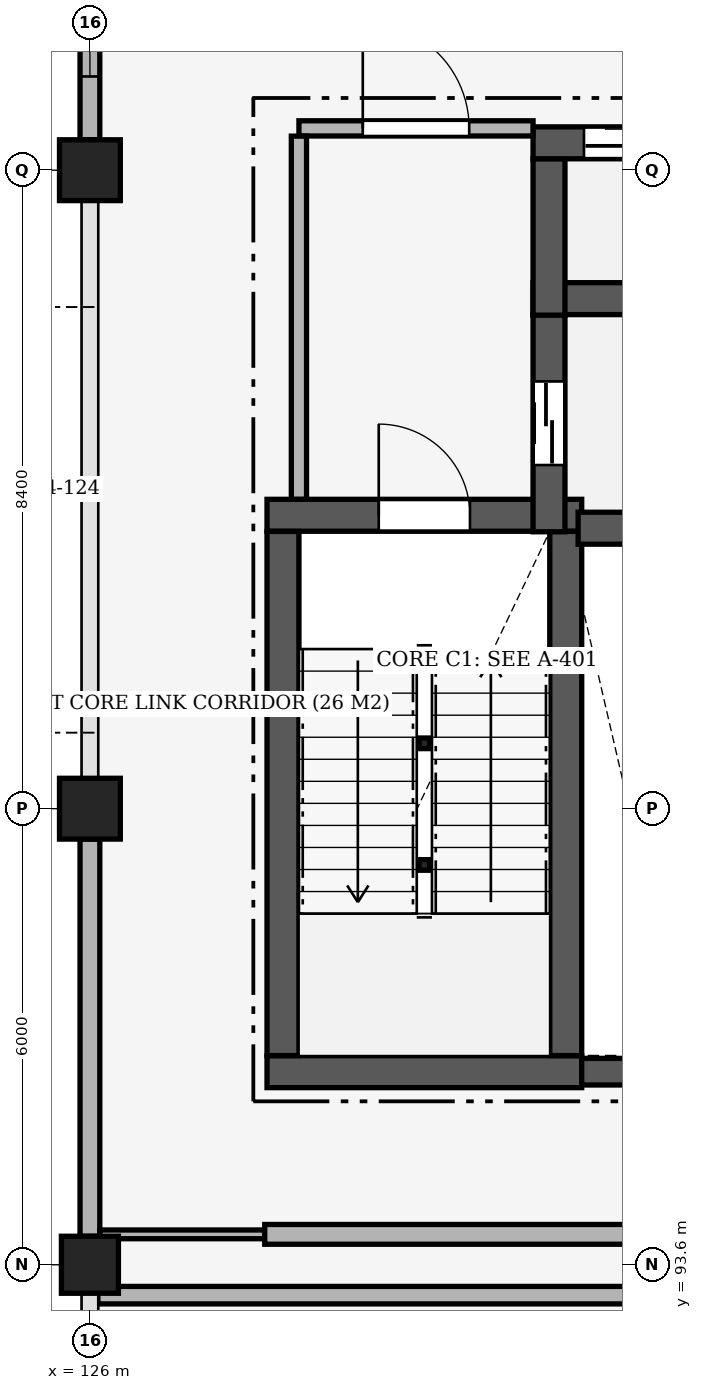
"""IFC4 building model, lengths in metres.
Left out: names, types, materials, properties, quantities, classifications, styles, units other than length and angle.
Written with IfcOpenShell. Run it as: python <this file> out.ifc"""

import sys

from ifc_helpers import new_model, si_unit, direction, frame, frame_2d, origin, origin_2d, place, context, subcontext, project, spatial, rectangle, hollow_circle, extrude, element, fill, save


model = new_model("IFC4")
c1 = context("Model", 3, precision=1e-05, world=origin(), true_north=direction((0.0, 1.0)))
c2 = subcontext(c1, "Body", "Model", "MODEL_VIEW")
j1 = project(units=[si_unit("LENGTHUNIT", "METRE"), si_unit("PLANEANGLEUNIT", "RADIAN")], contexts=[c1])
p1 = place(None, origin())
s1 = spatial("IfcSite", under=j1, at=p1, CompositionType="ELEMENT")
p2 = place(p1, origin())
s2 = spatial("IfcBuilding", under=s1, at=p2, CompositionType="ELEMENT")
p3 = place(p2, frame((0.0, 0.0, 20.4)))
s3 = spatial("IfcBuildingStorey", under=s2, at=p3, CompositionType="ELEMENT", Elevation=20.4)
p4 = place(p3, frame((126.0, 93.6, 0.0), z_axis=(0.0, 0.0, 1.0), x_axis=(1.0, 0.0, 0.0)))
e1 = element("IfcColumn", 1, at=p4, inside=s3, PredefinedType="COLUMN", context=c2, shape_type="SweptSolid", body=[
    extrude(rectangle(XDim=0.75, YDim=0.75, at=origin_2d()), origin(), (0.0, 0.0, 1.0), 4.8),
])
for number, where, z_axis, x_axis in (
    (2, (126.0, 99.6, 0.0), (0.0, 0.0, 1.0), (1.0, 0.0, 0.0)),
    (3, (126.0, 108.0, 0.0), (0.0, 0.0, 1.0), (1.0, 0.0, 0.0)),
):
    element("IfcColumn", number, at=place(p3, frame(where, z_axis=z_axis, x_axis=x_axis)), inside=s3, PredefinedType="COLUMN", context=c2, shape_type="SweptSolid", body=[
        extrude(rectangle(XDim=0.8, YDim=0.8, at=origin_2d()), origin(), (0.0, 0.0, 1.0), 4.8),
    ])
for number, where, z_axis, x_axis in (
    (4, (130.4, 98.86, -2.98), (0.0, 0.0, 1.0), (1.0, 0.0, 0.0)),
    (5, (130.4, 100.46, -2.98), (0.0, 0.0, 1.0), (1.0, 0.0, 0.0)),
):
    element("IfcColumn", number, at=place(p3, frame(where, z_axis=z_axis, x_axis=x_axis)), inside=s3, PredefinedType="COLUMN", context=c2, shape_type="SweptSolid", body=[
        extrude(hollow_circle(Radius=0.07, WallThickness=0.008, at=origin_2d()), origin(), (0.0, 0.0, 1.0), 4.95),
    ])
p5 = place(p3, frame((126.0, 93.975, 0.0), z_axis=(0.0, 0.0, 1.0), x_axis=(0.0, 1.0, 0.0)))
e6 = element("IfcWall", 6, at=p5, inside=s3, PredefinedType="SOLIDWALL", context=c2, shape_type="SweptSolid", body=[
    extrude(rectangle(XDim=5.225, YDim=0.26, at=frame_2d((2.612, 0.0))), origin(), (0.0, 0.0, 1.0), 4.0),
])
p6 = place(p3, frame((126.0, 108.4, 0.0), z_axis=(0.0, 0.0, 1.0), x_axis=(0.0, 1.0, 0.0)))
e7 = element("IfcWall", 7, at=p6, inside=s3, PredefinedType="SOLIDWALL", context=c2, shape_type="SweptSolid", body=[
    extrude(rectangle(XDim=4.6, YDim=0.26, at=frame_2d((2.3, 0.0))), origin(), (0.0, 0.0, 1.0), 4.0),
])
p7 = place(p6, frame((0.833, 0.0, 1.05)))
e8 = element("IfcOpeningElement", 8, at=p7, cuts=e7, PredefinedType="OPENING", context=c2, shape_type="SweptSolid", body=[
    extrude(rectangle(XDim=1.05, YDim=1.8, at=frame_2d((0.525, 0.9))), frame((0.0, 0.145, 0.0), z_axis=(0.0, -1.0, 0.0), x_axis=(1.0, 0.0, 0.0)), (0.0, 0.0, 1.0), 0.29),
])
p8 = place(p6, frame((2.717, 0.0, 1.05)))
e9 = element("IfcOpeningElement", 9, at=p8, cuts=e7, PredefinedType="OPENING", context=c2, shape_type="SweptSolid", body=[
    extrude(rectangle(XDim=1.05, YDim=1.8, at=frame_2d((0.525, 0.9))), frame((0.0, 0.145, 0.0), z_axis=(0.0, -1.0, 0.0), x_axis=(1.0, 0.0, 0.0)), (0.0, 0.0, 1.0), 0.29),
])
p9 = place(p3, frame((128.33, 103.46, 0.0), z_axis=(0.0, 0.0, 1.0), x_axis=(1.0, 0.0, 0.0)))
e10 = element("IfcWall", 10, at=p9, inside=s3, PredefinedType="SHEAR", context=c2, shape_type="SweptSolid", body=[
    extrude(rectangle(XDim=4.14, YDim=0.42, at=frame_2d((2.07, 0.0))), origin(), (0.0, 0.0, 1.0), 4.55),
])
p10 = place(p9, frame((1.47, 0.0, 0.0)))
e11 = element("IfcOpeningElement", 11, at=p10, cuts=e10, PredefinedType="OPENING", context=c2, shape_type="SweptSolid", body=[
    extrude(rectangle(XDim=1.2, YDim=2.2, at=frame_2d((0.6, 1.1))), frame((0.0, 0.225, 0.0), z_axis=(0.0, -1.0, 0.0), x_axis=(1.0, 0.0, 0.0)), (0.0, 0.0, 1.0), 0.45),
])
p11 = place(p3, frame((128.33, 96.14, 0.0), z_axis=(0.0, 0.0, 1.0), x_axis=(1.0, 0.0, 0.0)))
e12 = element("IfcWall", 12, at=p11, inside=s3, PredefinedType="SHEAR", context=c2, shape_type="SweptSolid", body=[
    extrude(rectangle(XDim=4.14, YDim=0.42, at=frame_2d((2.07, 0.0))), origin(), (0.0, 0.0, 1.0), 4.55),
])
for number, where, z_axis, x_axis in (
    (13, (128.54, 96.352, 0.0), (0.0, 0.0, 1.0), (0.0, 1.0, 0.0)),
    (14, (132.26, 96.352, 0.0), (0.0, 0.0, 1.0), (0.0, 1.0, 0.0)),
):
    element("IfcWall", number, at=place(p3, frame(where, z_axis=z_axis, x_axis=x_axis)), inside=s3, PredefinedType="SHEAR", context=c2, shape_type="SweptSolid", body=[
        extrude(rectangle(XDim=6.896, YDim=0.42, at=frame_2d((3.448, 0.0))), origin(), (0.0, 0.0, 1.0), 4.55),
    ])
p12 = place(p3, frame((132.423, 103.29, 0.0), z_axis=(0.0, 0.0, 1.0), x_axis=(1.0, 0.0, 0.0)))
e15 = element("IfcWall", 15, at=p12, inside=s3, PredefinedType="SHEAR", context=c2, shape_type="SweptSolid", body=[
    extrude(rectangle(XDim=1.847, YDim=0.42, at=frame_2d((0.923, 0.0))), origin(), (0.0, 0.0, 1.0), 4.55),
])
p13 = place(p3, frame((131.83, 106.31, 0.0), z_axis=(0.0, 0.0, 1.0), x_axis=(1.0, 0.0, 0.0)))
e16 = element("IfcWall", 16, at=p13, inside=s3, PredefinedType="SHEAR", context=c2, shape_type="SweptSolid", body=[
    extrude(rectangle(XDim=2.44, YDim=0.42, at=frame_2d((1.22, 0.0))), origin(), (0.0, 0.0, 1.0), 4.55),
])
p14 = place(p3, frame((132.04, 103.243, 0.0), z_axis=(0.0, 0.0, 1.0), x_axis=(0.0, 1.0, 0.0)))
e17 = element("IfcWall", 17, at=p14, inside=s3, PredefinedType="SHEAR", context=c2, shape_type="SweptSolid", body=[
    extrude(rectangle(XDim=2.855, YDim=0.42, at=frame_2d((1.427, 0.0))), origin(), (0.0, 0.0, 1.0), 4.55),
])
p15 = place(p14, frame((0.878, 0.0, 0.0)))
e18 = element("IfcOpeningElement", 18, at=p15, cuts=e17, PredefinedType="OPENING", context=c2, shape_type="SweptSolid", body=[
    extrude(rectangle(XDim=1.1, YDim=2.15, at=frame_2d((0.55, 1.075))), frame((0.0, 0.225, 0.0), z_axis=(0.0, -1.0, 0.0), x_axis=(1.0, 0.0, 0.0)), (0.0, 0.0, 1.0), 0.45),
])
p16 = place(p3, frame((131.83, 108.36, 0.0), z_axis=(0.0, 0.0, 1.0), x_axis=(1.0, 0.0, 0.0)))
e19 = element("IfcWall", 19, at=p16, inside=s3, PredefinedType="SHEAR", context=c2, shape_type="SweptSolid", body=[
    extrude(rectangle(XDim=2.44, YDim=0.42, at=frame_2d((1.22, 0.0))), origin(), (0.0, 0.0, 1.0), 4.55),
])
p17 = place(p16, frame((0.67, 0.0, 0.0)))
e20 = element("IfcOpeningElement", 20, at=p17, cuts=e19, PredefinedType="OPENING", context=c2, shape_type="SweptSolid", body=[
    extrude(rectangle(XDim=1.1, YDim=2.15, at=frame_2d((0.55, 1.075))), frame((0.0, 0.225, 0.0), z_axis=(0.0, -1.0, 0.0), x_axis=(1.0, 0.0, 0.0)), (0.0, 0.0, 1.0), 0.45),
])
p18 = place(p3, frame((132.04, 106.093, 0.0), z_axis=(0.0, 0.0, 1.0), x_axis=(0.0, 1.0, 0.0)))
e21 = element("IfcWall", 21, at=p18, inside=s3, PredefinedType="SHEAR", context=c2, shape_type="SweptSolid", body=[
    extrude(rectangle(XDim=2.055, YDim=0.42, at=frame_2d((1.027, 0.0))), origin(), (0.0, 0.0, 1.0), 4.55),
])
p19 = place(p3, frame((132.47, 96.14, 0.0), z_axis=(0.0, 0.0, 1.0), x_axis=(1.0, 0.0, 0.0)))
e22 = element("IfcWall", 22, at=p19, inside=s3, PredefinedType="SHEAR", context=c2, shape_type="SweptSolid", body=[
    extrude(rectangle(XDim=1.8, YDim=0.35, at=frame_2d((0.9, 0.0))), origin(), (0.0, 0.0, 1.0), 4.55),
])
p20 = place(p3, frame((126.105, 93.2, 0.0), z_axis=(0.0, 0.0, 1.0), x_axis=(1.0, 0.0, 0.0)))
e23 = element("IfcWall", 23, at=p20, inside=s3, PredefinedType="SOLIDWALL", context=c2, shape_type="SweptSolid", body=[
    extrude(rectangle(XDim=12.695, YDim=0.23, at=frame_2d((6.348, 0.0))), origin(), (0.0, 0.0, 1.0), 3.85),
])
p21 = place(p3, frame((126.132, 94.0, 0.0), z_axis=(0.0, 0.0, 1.0), x_axis=(1.0, 0.0, 0.0)))
e24 = element("IfcWall", 24, at=p21, inside=s3, PredefinedType="PARTITIONING", context=c2, shape_type="SweptSolid", body=[
    extrude(rectangle(XDim=2.168, YDim=0.115, at=frame_2d((1.084, 0.0))), origin(), (0.0, 0.0, 1.0), 4.0),
])
p22 = place(p3, frame((128.3, 94.0, 0.0), z_axis=(0.0, 0.0, 1.0), x_axis=(1.0, 0.0, 0.0)))
e25 = element("IfcWall", 25, at=p22, inside=s3, PredefinedType="PARTITIONING", context=c2, shape_type="SweptSolid", body=[
    extrude(rectangle(XDim=10.5, YDim=0.26, at=frame_2d((5.25, 0.0))), origin(), (0.0, 0.0, 1.0), 4.0),
])
p23 = place(p3, frame((128.75, 108.55, 0.0), z_axis=(0.0, 0.0, 1.0), x_axis=(1.0, 0.0, 0.0)))
e26 = element("IfcWall", 26, at=p23, inside=s3, PredefinedType="PARTITIONING", context=c2, shape_type="SweptSolid", body=[
    extrude(rectangle(XDim=3.08, YDim=0.2, at=frame_2d((1.54, 0.0))), origin(), (0.0, 0.0, 1.0), 4.55),
])
p24 = place(p23, frame((0.84, 0.0, 0.0)))
e27 = element("IfcOpeningElement", 27, at=p24, cuts=e26, PredefinedType="OPENING", context=c2, shape_type="SweptSolid", body=[
    extrude(rectangle(XDim=1.4, YDim=2.2, at=frame_2d((0.7, 1.1))), frame((0.0, 0.115, 0.0), z_axis=(0.0, -1.0, 0.0), x_axis=(1.0, 0.0, 0.0)), (0.0, 0.0, 1.0), 0.23),
])
p25 = place(p3, frame((128.75, 103.672, 0.0), z_axis=(0.0, 0.0, 1.0), x_axis=(0.0, 1.0, 0.0)))
e28 = element("IfcWall", 28, at=p25, inside=s3, PredefinedType="PARTITIONING", context=c2, shape_type="SweptSolid", body=[
    extrude(rectangle(XDim=4.776, YDim=0.2, at=frame_2d((2.388, 0.0))), origin(), (0.0, 0.0, 1.0), 4.55),
])
p26 = place(p7, origin())
e29 = element("IfcWindow", 29, at=p26, inside=s3, PartitioningType="SINGLE_PANEL", PredefinedType="WINDOW", context=c2, shape_type="SweptSolid", body=[
    extrude(rectangle(XDim=1.05, YDim=1.8, at=frame_2d((0.525, 0.9))), frame((0.0, 0.03, 0.0), z_axis=(0.0, -1.0, 0.0), x_axis=(1.0, 0.0, 0.0)), (0.0, 0.0, 1.0), 0.06),
])
fill(e8, e29)
p27 = place(p10, origin())
e30 = element("IfcDoor", 30, at=p27, inside=s3, OperationType="SINGLE_SWING_LEFT", PredefinedType="DOOR", context=c2, shape_type="SweptSolid", body=[
    extrude(rectangle(XDim=1.2, YDim=2.2, at=frame_2d((0.6, 1.1))), frame((0.0, 0.025, 0.0), z_axis=(0.0, -1.0, 0.0), x_axis=(1.0, 0.0, 0.0)), (0.0, 0.0, 1.0), 0.05),
])
fill(e11, e30)
p28 = place(p15, origin())
e31 = element("IfcDoor", 31, at=p28, inside=s3, OperationType="DOUBLE_DOOR_SLIDING", PredefinedType="DOOR", context=c2, shape_type="SweptSolid", body=[
    extrude(rectangle(XDim=1.1, YDim=2.15, at=frame_2d((0.55, 1.075))), frame((0.0, 0.025, 0.0), z_axis=(0.0, -1.0, 0.0), x_axis=(1.0, 0.0, 0.0)), (0.0, 0.0, 1.0), 0.05),
])
fill(e18, e31)
p29 = place(p17, origin())
e32 = element("IfcDoor", 32, at=p29, inside=s3, OperationType="DOUBLE_DOOR_SLIDING", PredefinedType="DOOR", context=c2, shape_type="SweptSolid", body=[
    extrude(rectangle(XDim=1.1, YDim=2.15, at=frame_2d((0.55, 1.075))), frame((0.0, 0.025, 0.0), z_axis=(0.0, -1.0, 0.0), x_axis=(1.0, 0.0, 0.0)), (0.0, 0.0, 1.0), 0.05),
])
fill(e20, e32)
p30 = place(p24, origin())
e33 = element("IfcDoor", 33, at=p30, inside=s3, OperationType="SINGLE_SWING_LEFT", PredefinedType="DOOR", context=c2, shape_type="SweptSolid", body=[
    extrude(rectangle(XDim=1.4, YDim=2.2, at=frame_2d((0.7, 1.1))), frame((0.0, 0.025, 0.0), z_axis=(0.0, -1.0, 0.0), x_axis=(1.0, 0.0, 0.0)), (0.0, 0.0, 1.0), 0.05),
])
fill(e27, e33)
save(model, sys.argv[1])
